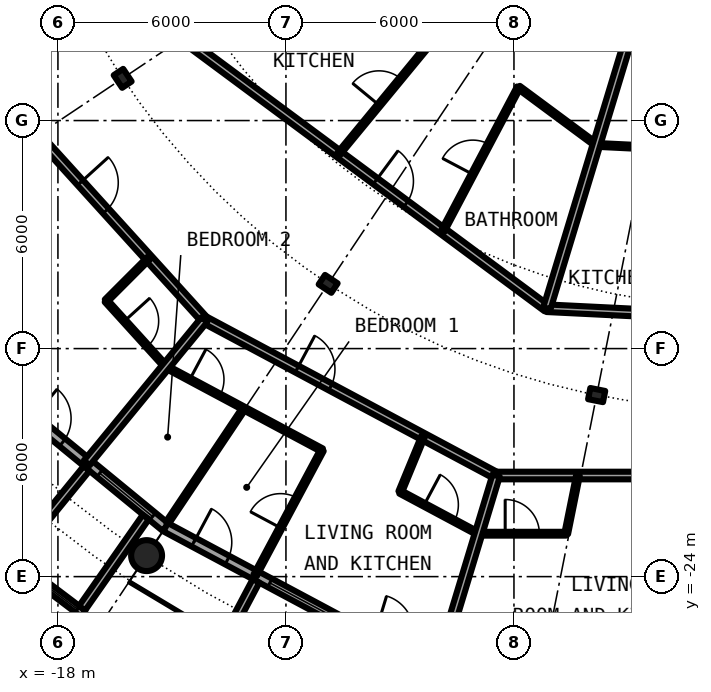
"""IFC4 building model, lengths in metres.
Left out: names, types, materials, properties, quantities, classifications, styles, units other than length and angle.
Written with IfcOpenShell. Run it as: python <this file> out.ifc"""

import sys

from ifc_helpers import new_model, si_unit, direction, frame, frame_2d, origin, origin_2d, place, context, subcontext, project, spatial, rectangle, circle, hollow_circle, i_section, extrude, element, fill, save


model = new_model("IFC4")
c1 = context("Model", 3, precision=1e-05, world=origin(), true_north=direction((0.0, 1.0)))
c2 = subcontext(c1, "Body", "Model", "MODEL_VIEW")
j1 = project(units=[si_unit("LENGTHUNIT", "METRE"), si_unit("PLANEANGLEUNIT", "RADIAN")], contexts=[c1])
p1 = place(None, origin())
s1 = spatial("IfcSite", under=j1, at=p1, CompositionType="ELEMENT")
p2 = place(p1, origin())
s2 = spatial("IfcBuilding", under=s1, at=p2, CompositionType="ELEMENT")
p3 = place(p2, frame((0.0, 0.0, 218.8)))
s3 = spatial("IfcBuildingStorey", under=s2, at=p3, CompositionType="ELEMENT", Elevation=218.8)
p4 = place(p3, frame((-15.667, -23.448, 0.0), z_axis=(0.0, 0.0, 1.0), x_axis=(1.0, 0.0, 0.0)))
e1 = element("IfcColumn", 1, at=p4, inside=s3, PredefinedType="COLUMN", context=c2, shape_type="SweptSolid", body=[
    extrude(hollow_circle(Radius=0.406, WallThickness=0.03, at=origin_2d()), origin(), (0.0, 0.0, 1.0), 3.05),
])
for number, where, z_axis, x_axis in (
    (2, (-16.297, -10.889, 0.0), (0.0, 0.0, 1.0), (-0.831, -0.556, 0.0)),
    (3, (-10.889, -16.297, 0.0), (0.0, 0.0, 1.0), (-0.556, -0.831, 0.0)),
    (4, (-3.824, -19.223, 0.0), (0.0, 0.0, 1.0), (-0.195, -0.981, 0.0)),
):
    element("IfcColumn", number, at=place(p3, frame(where, z_axis=z_axis, x_axis=x_axis)), inside=s3, PredefinedType="COLUMN", context=c2, shape_type="SweptSolid", body=[
        extrude(i_section(OverallWidth=0.3, OverallDepth=0.4, WebThickness=0.013, FlangeThickness=0.024, FilletRadius=0.027, at=origin_2d()), origin(), (0.0, 0.0, 1.0), 3.05),
    ])
p5 = place(p3, frame((-19.304, -19.304, 0.0), z_axis=(0.0, 0.0, 1.0), x_axis=(0.773019449054, -0.634382322723, 0.0)))
e5 = element("IfcWall", 5, at=p5, inside=s3, PredefinedType="SOLIDWALL", context=c2, shape_type="SweptSolid", body=[
    extrude(rectangle(XDim=5.352, YDim=0.25, at=frame_2d((2.676, 0.0))), origin(), (0.0, 0.0, 1.0), 2.65),
])
p6 = place(p5, frame((0.841, 0.0, 0.0)))
e6 = element("IfcOpeningElement", 6, at=p6, cuts=e5, PredefinedType="OPENING", context=c2, shape_type="SweptSolid", body=[
    extrude(rectangle(XDim=1.0, YDim=2.2, at=frame_2d((0.5, 1.1))), frame((0.0, 0.135, 0.0), z_axis=(0.0, -1.0, 0.0), x_axis=(1.0, 0.0, 0.0)), (0.0, 0.0, 1.0), 0.27),
])
p7 = place(p5, frame((3.111, 0.0, 0.3)))
e7 = element("IfcOpeningElement", 7, at=p7, cuts=e5, PredefinedType="OPENING", context=c2, shape_type="SweptSolid", body=[
    extrude(rectangle(XDim=1.8, YDim=2.1, at=frame_2d((0.9, 1.05))), frame((0.0, 0.135, 0.0), z_axis=(0.0, -1.0, 0.0), x_axis=(1.0, 0.0, 0.0)), (0.0, 0.0, 1.0), 0.27),
])
p8 = place(p3, frame((-19.289, -23.497, -0.03), z_axis=(0.0, 0.0, 1.0), x_axis=(0.797887588059, -0.602806268067, 0.0)))
e8 = element("IfcWall", 8, at=p8, inside=s3, PredefinedType="SOLIDWALL", context=c2, shape_type="SweptSolid", body=[
    extrude(rectangle(XDim=2.447, YDim=0.2, at=frame_2d((1.223, 0.0))), origin(), (0.0, 0.0, 1.0), 2.68),
])
p9 = place(p8, frame((0.183, 0.0, 0.33)))
e9 = element("IfcOpeningElement", 9, at=p9, cuts=e8, PredefinedType="OPENING", context=c2, shape_type="SweptSolid", body=[
    extrude(circle(Radius=1.04, at=frame_2d((1.04, 1.04))), frame((0.0, 0.11, 0.0), z_axis=(0.0, -1.0, 0.0), x_axis=(1.0, 0.0, 0.0)), (0.0, 0.0, 1.0), 0.22),
])
p10 = place(p3, frame((-17.246, -21.155, -0.03), z_axis=(0.0, 0.0, 1.0), x_axis=(-0.631741648902, -0.775179004516, 0.0)))
e10 = element("IfcWall", 10, at=p10, inside=s3, PredefinedType="SOLIDWALL", context=c2, shape_type="SweptSolid", body=[
    extrude(rectangle(XDim=3.006, YDim=0.2, at=frame_2d((1.503, 0.0))), origin(), (0.0, 0.0, 1.0), 2.68),
])
p11 = place(p3, frame((-15.688, -22.433, -0.03), z_axis=(0.0, 0.0, 1.0), x_axis=(-0.573260687834, -0.819373043115, 0.0)))
e11 = element("IfcWall", 11, at=p11, inside=s3, PredefinedType="SOLIDWALL", context=c2, shape_type="SweptSolid", body=[
    extrude(rectangle(XDim=2.925, YDim=0.2, at=frame_2d((1.463, 0.0))), origin(), (0.0, 0.0, 1.0), 2.68),
])
p12 = place(p3, frame((-15.167, -22.699, 0.0), z_axis=(0.0, 0.0, 1.0), x_axis=(0.881915646801, -0.471407246368, 0.0)))
e12 = element("IfcWall", 12, at=p12, inside=s3, PredefinedType="SOLIDWALL", context=c2, shape_type="SweptSolid", body=[
    extrude(rectangle(XDim=5.352, YDim=0.25, at=frame_2d((2.676, 0.0))), origin(), (0.0, 0.0, 1.0), 2.65),
])
p13 = place(p12, frame((0.841, 0.0, 0.0)))
e13 = element("IfcOpeningElement", 13, at=p13, cuts=e12, PredefinedType="OPENING", context=c2, shape_type="SweptSolid", body=[
    extrude(rectangle(XDim=1.0, YDim=2.2, at=frame_2d((0.5, 1.1))), frame((0.0, 0.135, 0.0), z_axis=(0.0, -1.0, 0.0), x_axis=(1.0, 0.0, 0.0)), (0.0, 0.0, 1.0), 0.27),
])
p14 = place(p12, frame((3.111, 0.0, 0.3)))
e14 = element("IfcOpeningElement", 14, at=p14, cuts=e12, PredefinedType="OPENING", context=c2, shape_type="SweptSolid", body=[
    extrude(rectangle(XDim=1.8, YDim=2.1, at=frame_2d((0.9, 1.05))), frame((0.0, 0.135, 0.0), z_axis=(0.0, -1.0, 0.0), x_axis=(1.0, 0.0, 0.0)), (0.0, 0.0, 1.0), 0.27),
])
p15 = place(p3, frame((-12.787, -24.113, -0.03), z_axis=(0.0, 0.0, 1.0), x_axis=(-0.468365282436, -0.883534924159, 0.0)))
e15 = element("IfcWall", 15, at=p15, inside=s3, PredefinedType="SOLIDWALL", context=c2, shape_type="SweptSolid", body=[
    extrude(rectangle(XDim=3.006, YDim=0.2, at=frame_2d((1.503, 0.0))), origin(), (0.0, 0.0, 1.0), 2.68),
])
p16 = place(p3, frame((-16.732, -16.743, 0.0), z_axis=(0.0, 0.0, 1.0), x_axis=(0.671528384412, -0.740978831634, 0.0)))
e16 = element("IfcWall", 16, at=p16, inside=s3, PredefinedType="PARTITIONING", context=c2, shape_type="SweptSolid", body=[
    extrude(rectangle(XDim=2.338, YDim=0.1, at=frame_2d((1.169, 0.0))), origin(), (0.0, 0.0, 1.0), 2.65),
])
p17 = place(p16, frame((0.719, 0.0, 0.0)))
e17 = element("IfcOpeningElement", 17, at=p17, cuts=e16, PredefinedType="OPENING", context=c2, shape_type="SweptSolid", body=[
    extrude(rectangle(XDim=0.9, YDim=2.3, at=frame_2d((0.45, 1.15))), frame((0.0, 0.06, 0.0), z_axis=(0.0, -1.0, 0.0), x_axis=(1.0, 0.0, 0.0)), (0.0, 0.0, 1.0), 0.12),
])
p18 = place(p3, frame((-15.162, -18.475, 0.0), z_axis=(0.0, 0.0, 1.0), x_axis=(0.881916280728, -0.471406060405, 0.0)))
e18 = element("IfcWall", 18, at=p18, inside=s3, PredefinedType="PARTITIONING", context=c2, shape_type="SweptSolid", body=[
    extrude(rectangle(XDim=4.663, YDim=0.1, at=frame_2d((2.331, 0.0))), origin(), (0.0, 0.0, 1.0), 2.65),
])
p19 = place(p18, frame((0.716, 0.0, 0.0)))
e19 = element("IfcOpeningElement", 19, at=p19, cuts=e18, PredefinedType="OPENING", context=c2, shape_type="SweptSolid", body=[
    extrude(rectangle(XDim=0.9, YDim=2.3, at=frame_2d((0.45, 1.15))), frame((0.0, 0.06, 0.0), z_axis=(0.0, -1.0, 0.0), x_axis=(1.0, 0.0, 0.0)), (0.0, 0.0, 1.0), 0.12),
])
p20 = place(p3, frame((-8.994, -21.772, 0.0), z_axis=(0.0, 0.0, 1.0), x_axis=(0.881882873346, -0.471468554305, 0.0)))
e20 = element("IfcWall", 20, at=p20, inside=s3, PredefinedType="PARTITIONING", context=c2, shape_type="SweptSolid", body=[
    extrude(rectangle(XDim=2.331, YDim=0.1, at=frame_2d((1.166, 0.0))), origin(), (0.0, 0.0, 1.0), 2.65),
])
p21 = place(p20, frame((0.716, 0.0, 0.0)))
e21 = element("IfcOpeningElement", 21, at=p21, cuts=e20, PredefinedType="OPENING", context=c2, shape_type="SweptSolid", body=[
    extrude(rectangle(XDim=0.9, YDim=2.3, at=frame_2d((0.45, 1.15))), frame((0.0, 0.06, 0.0), z_axis=(0.0, -1.0, 0.0), x_axis=(1.0, 0.0, 0.0)), (0.0, 0.0, 1.0), 0.12),
])
p22 = place(p3, frame((-6.938, -22.871, 0.0), z_axis=(0.0, 0.0, 1.0), x_axis=(1.0, 0.0, 0.0)))
e22 = element("IfcWall", 22, at=p22, inside=s3, PredefinedType="PARTITIONING", context=c2, shape_type="SweptSolid", body=[
    extrude(rectangle(XDim=2.313, YDim=0.1, at=frame_2d((1.156, 0.0))), origin(), (0.0, 0.0, 1.0), 2.65),
])
p23 = place(p22, frame((0.707, 0.0, 0.0)))
e23 = element("IfcOpeningElement", 23, at=p23, cuts=e22, PredefinedType="OPENING", context=c2, shape_type="SweptSolid", body=[
    extrude(rectangle(XDim=0.9, YDim=2.3, at=frame_2d((0.45, 1.15))), frame((0.0, 0.06, 0.0), z_axis=(0.0, -1.0, 0.0), x_axis=(1.0, 0.0, 0.0)), (0.0, 0.0, 1.0), 0.12),
])
p24 = place(p3, frame((-18.542, -12.389, 0.0), z_axis=(0.0, 0.0, 1.0), x_axis=(0.671561669125, -0.740948665268, 0.0)))
e24 = element("IfcWall", 24, at=p24, inside=s3, PredefinedType="PARTITIONING", context=c2, shape_type="SweptSolid", body=[
    extrude(rectangle(XDim=6.544, YDim=0.2, at=frame_2d((3.272, 0.0))), origin(), (0.0, 0.0, 1.0), 2.65),
])
p25 = place(p24, frame((1.682, 0.0, 0.0)))
e25 = element("IfcOpeningElement", 25, at=p25, cuts=e24, PredefinedType="OPENING", context=c2, shape_type="SweptSolid", body=[
    extrude(rectangle(XDim=1.0, YDim=2.3, at=frame_2d((0.5, 1.15))), frame((0.0, 0.11, 0.0), z_axis=(0.0, -1.0, 0.0), x_axis=(1.0, 0.0, 0.0)), (0.0, 0.0, 1.0), 0.22),
])
p26 = place(p3, frame((-14.147, -17.238, 0.0), z_axis=(0.0, 0.0, 1.0), x_axis=(0.881941116964, -0.471359593312, 0.0)))
e26 = element("IfcWall", 26, at=p26, inside=s3, PredefinedType="PARTITIONING", context=c2, shape_type="SweptSolid", body=[
    extrude(rectangle(XDim=8.705, YDim=0.2, at=frame_2d((4.352, 0.0))), origin(), (0.0, 0.0, 1.0), 2.65),
])
p27 = place(p26, frame((2.763, 0.0, 0.0)))
e27 = element("IfcOpeningElement", 27, at=p27, cuts=e26, PredefinedType="OPENING", context=c2, shape_type="SweptSolid", body=[
    extrude(rectangle(XDim=1.0, YDim=2.3, at=frame_2d((0.5, 1.15))), frame((0.0, 0.11, 0.0), z_axis=(0.0, -1.0, 0.0), x_axis=(1.0, 0.0, 0.0)), (0.0, 0.0, 1.0), 0.22),
])
p28 = place(p3, frame((-6.473, -21.34, 0.0), z_axis=(0.0, 0.0, 1.0), x_axis=(1.0, 0.0, 0.0)))
e28 = element("IfcWall", 28, at=p28, inside=s3, PredefinedType="PARTITIONING", context=c2, shape_type="SweptSolid", body=[
    extrude(rectangle(XDim=12.946, YDim=0.2, at=frame_2d((6.473, 0.0))), origin(), (0.0, 0.0, 1.0), 2.65),
])
p29 = place(p28, frame((7.051, 0.0, 0.0)))
e29 = element("IfcOpeningElement", 29, at=p29, cuts=e28, PredefinedType="OPENING", context=c2, shape_type="SweptSolid", body=[
    extrude(rectangle(XDim=1.0, YDim=2.3, at=frame_2d((0.5, 1.15))), frame((0.0, 0.11, 0.0), z_axis=(0.0, -1.0, 0.0), x_axis=(1.0, 0.0, 0.0)), (0.0, 0.0, 1.0), 0.22),
])
p30 = place(p3, frame((-5.138, -16.938, 0.0), z_axis=(0.0, 0.0, 1.0), x_axis=(0.998789433108, -0.049190124121, 0.0)))
e30 = element("IfcWall", 30, at=p30, inside=s3, PredefinedType="PARTITIONING", context=c2, shape_type="SweptSolid", body=[
    extrude(rectangle(XDim=8.601, YDim=0.2, at=frame_2d((4.301, 0.0))), origin(), (0.0, 0.0, 1.0), 2.65),
])
p31 = place(p30, frame((3.802, 0.0, 0.0)))
e31 = element("IfcOpeningElement", 31, at=p31, cuts=e30, PredefinedType="OPENING", context=c2, shape_type="SweptSolid", body=[
    extrude(rectangle(XDim=1.0, YDim=2.3, at=frame_2d((0.5, 1.15))), frame((0.0, 0.11, 0.0), z_axis=(0.0, -1.0, 0.0), x_axis=(1.0, 0.0, 0.0)), (0.0, 0.0, 1.0), 0.22),
])
p32 = place(p3, frame((-14.718, -9.833, 0.0), z_axis=(0.0, 0.0, 1.0), x_axis=(0.803240181354, -0.595655278712, 0.0)))
e32 = element("IfcWall", 32, at=p32, inside=s3, PredefinedType="PARTITIONING", context=c2, shape_type="SweptSolid", body=[
    extrude(rectangle(XDim=11.928, YDim=0.2, at=frame_2d((5.964, 0.0))), origin(), (0.0, 0.0, 1.0), 2.65),
])
p33 = place(p32, frame((6.316, 0.0, 0.0)))
e33 = element("IfcOpeningElement", 33, at=p33, cuts=e32, PredefinedType="OPENING", context=c2, shape_type="SweptSolid", body=[
    extrude(rectangle(XDim=1.0, YDim=2.3, at=frame_2d((0.5, 1.15))), frame((0.0, 0.11, 0.0), z_axis=(0.0, -1.0, 0.0), x_axis=(1.0, 0.0, 0.0)), (0.0, 0.0, 1.0), 0.22),
])
p34 = place(p3, frame((-3.834, -12.64, 0.0), z_axis=(0.0, 0.0, 1.0), x_axis=(0.998790464653, -0.049169174464, 0.0)))
e34 = element("IfcWall", 34, at=p34, inside=s3, PredefinedType="PARTITIONING", context=c2, shape_type="SweptSolid", body=[
    extrude(rectangle(XDim=2.567, YDim=0.1, at=frame_2d((1.284, 0.0))), origin(), (0.0, 0.0, 1.0), 2.65),
])
p35 = place(p3, frame((-5.874, -11.127, 0.0), z_axis=(0.0, 0.0, 1.0), x_axis=(0.803533389313, -0.595259684725, 0.0)))
e35 = element("IfcWall", 35, at=p35, inside=s3, PredefinedType="PARTITIONING", context=c2, shape_type="SweptSolid", body=[
    extrude(rectangle(XDim=2.544, YDim=0.1, at=frame_2d((1.272, 0.0))), origin(), (0.0, 0.0, 1.0), 2.65),
])
p36 = place(p3, frame((-17.24, -21.007, 0.0), z_axis=(0.0, 0.0, 1.0), x_axis=(0.634374159378, 0.773026148273, 0.0)))
e36 = element("IfcWall", 36, at=p36, inside=s3, PredefinedType="PARTITIONING", context=c2, shape_type="SweptSolid", body=[
    extrude(rectangle(XDim=4.876, YDim=0.2, at=frame_2d((2.438, 0.0))), origin(), (0.0, 0.0, 1.0), 2.65),
])
p37 = place(p3, frame((-16.732, -16.743, 0.0), z_axis=(0.0, 0.0, 1.0), x_axis=(0.70679853939, 0.707414888673, 0.0)))
e37 = element("IfcWall", 37, at=p37, inside=s3, PredefinedType="PARTITIONING", context=c2, shape_type="SweptSolid", body=[
    extrude(rectangle(XDim=1.584, YDim=0.1, at=frame_2d((0.792, 0.0))), origin(), (0.0, 0.0, 1.0), 2.65),
])
p38 = place(p3, frame((-15.119, -22.581, 0.0), z_axis=(0.0, 0.0, 1.0), x_axis=(0.556271723484, 0.831000463088, 0.0)))
e38 = element("IfcWall", 38, at=p38, inside=s3, PredefinedType="PARTITIONING", context=c2, shape_type="SweptSolid", body=[
    extrude(rectangle(XDim=3.619, YDim=0.1, at=frame_2d((1.809, 0.0))), origin(), (0.0, 0.0, 1.0), 2.65),
])
p39 = place(p3, frame((-12.81, -23.966, 0.0), z_axis=(0.0, 0.0, 1.0), x_axis=(0.471372010014, 0.881934480659, 0.0)))
e39 = element("IfcWall", 39, at=p39, inside=s3, PredefinedType="PARTITIONING", context=c2, shape_type="SweptSolid", body=[
    extrude(rectangle(XDim=3.734, YDim=0.1, at=frame_2d((1.867, 0.0))), origin(), (0.0, 0.0, 1.0), 2.65),
])
p40 = place(p39, frame((1.417, 0.0, 0.0)))
e40 = element("IfcOpeningElement", 40, at=p40, cuts=e39, PredefinedType="OPENING", context=c2, shape_type="SweptSolid", body=[
    extrude(rectangle(XDim=0.9, YDim=2.3, at=frame_2d((0.45, 1.15))), frame((0.0, 0.06, 0.0), z_axis=(0.0, -1.0, 0.0), x_axis=(1.0, 0.0, 0.0)), (0.0, 0.0, 1.0), 0.12),
])
p41 = place(p3, frame((-10.612, -12.878, 0.0), z_axis=(0.0, 0.0, 1.0), x_axis=(0.636115614725, 0.771593756262, 0.0)))
e41 = element("IfcWall", 41, at=p41, inside=s3, PredefinedType="PARTITIONING", context=c2, shape_type="SweptSolid", body=[
    extrude(rectangle(XDim=8.967, YDim=0.1, at=frame_2d((4.483, 0.0))), origin(), (0.0, 0.0, 1.0), 2.65),
])
p42 = place(p41, frame((1.667, 0.0, 0.0)))
e42 = element("IfcOpeningElement", 42, at=p42, cuts=e41, PredefinedType="OPENING", context=c2, shape_type="SweptSolid", body=[
    extrude(rectangle(XDim=0.9, YDim=2.3, at=frame_2d((0.45, 1.15))), frame((0.0, 0.06, 0.0), z_axis=(0.0, -1.0, 0.0), x_axis=(1.0, 0.0, 0.0)), (0.0, 0.0, 1.0), 0.12),
])
p43 = place(p41, frame((6.151, 0.0, 0.0)))
e43 = element("IfcOpeningElement", 43, at=p43, cuts=e41, PredefinedType="OPENING", context=c2, shape_type="SweptSolid", body=[
    extrude(rectangle(XDim=0.9, YDim=2.3, at=frame_2d((0.45, 1.15))), frame((0.0, 0.06, 0.0), z_axis=(0.0, -1.0, 0.0), x_axis=(1.0, 0.0, 0.0)), (0.0, 0.0, 1.0), 0.12),
])
p44 = place(p3, frame((-8.994, -21.772, 0.0), z_axis=(0.0, 0.0, 1.0), x_axis=(0.381535938362, 0.924354005638, 0.0)))
e44 = element("IfcWall", 44, at=p44, inside=s3, PredefinedType="PARTITIONING", context=c2, shape_type="SweptSolid", body=[
    extrude(rectangle(XDim=1.577, YDim=0.1, at=frame_2d((0.789, 0.0))), origin(), (0.0, 0.0, 1.0), 2.65),
])
p45 = place(p3, frame((-7.883, -26.006, 0.0), z_axis=(0.0, 0.0, 1.0), x_axis=(0.290085236897, 0.957000812609, 0.0)))
e45 = element("IfcWall", 45, at=p45, inside=s3, PredefinedType="PARTITIONING", context=c2, shape_type="SweptSolid", body=[
    extrude(rectangle(XDim=4.875, YDim=0.2, at=frame_2d((2.438, 0.0))), origin(), (0.0, 0.0, 1.0), 2.65),
])
p46 = place(p3, frame((-7.874, -14.909, 0.0), z_axis=(0.0, 0.0, 1.0), x_axis=(0.467030118529, 0.884241408432, 0.0)))
e46 = element("IfcWall", 46, at=p46, inside=s3, PredefinedType="PARTITIONING", context=c2, shape_type="SweptSolid", body=[
    extrude(rectangle(XDim=4.278, YDim=0.1, at=frame_2d((2.139, 0.0))), origin(), (0.0, 0.0, 1.0), 2.65),
])
p47 = place(p46, frame((1.69, 0.0, 0.0)))
e47 = element("IfcOpeningElement", 47, at=p47, cuts=e46, PredefinedType="OPENING", context=c2, shape_type="SweptSolid", body=[
    extrude(rectangle(XDim=0.9, YDim=2.3, at=frame_2d((0.45, 1.15))), frame((0.0, 0.06, 0.0), z_axis=(0.0, -1.0, 0.0), x_axis=(1.0, 0.0, 0.0)), (0.0, 0.0, 1.0), 0.12),
])
p48 = place(p3, frame((-5.134, -16.939, 0.0), z_axis=(0.0, 0.0, 1.0), x_axis=(0.290194791136, 0.956967597778, 0.0)))
e48 = element("IfcWall", 48, at=p48, inside=s3, PredefinedType="PARTITIONING", context=c2, shape_type="SweptSolid", body=[
    extrude(rectangle(XDim=9.979, YDim=0.2, at=frame_2d((4.99, 0.0))), origin(), (0.0, 0.0, 1.0), 2.65),
])
p49 = place(p3, frame((-4.625, -22.871, 0.0), z_axis=(0.0, 0.0, 1.0), x_axis=(0.19788933956, 0.98022436681, 0.0)))
e49 = element("IfcWall", 49, at=p49, inside=s3, PredefinedType="PARTITIONING", context=c2, shape_type="SweptSolid", body=[
    extrude(rectangle(XDim=1.562, YDim=0.1, at=frame_2d((0.781, 0.0))), origin(), (0.0, 0.0, 1.0), 2.65),
])
p50 = place(p6, origin())
e50 = element("IfcDoor", 50, at=p50, inside=s3, OperationType="SINGLE_SWING_LEFT", PredefinedType="DOOR", context=c2, shape_type="SweptSolid", body=[
    extrude(rectangle(XDim=1.0, YDim=2.2, at=frame_2d((0.5, 1.1))), frame((0.0, 0.025, 0.0), z_axis=(0.0, -1.0, 0.0), x_axis=(1.0, 0.0, 0.0)), (0.0, 0.0, 1.0), 0.05),
])
fill(e6, e50)
p51 = place(p7, origin())
e51 = element("IfcWindow", 51, at=p51, inside=s3, PartitioningType="SINGLE_PANEL", PredefinedType="WINDOW", context=c2, shape_type="SweptSolid", body=[
    extrude(rectangle(XDim=1.8, YDim=2.1, at=frame_2d((0.9, 1.05))), frame((0.0, 0.03, 0.0), z_axis=(0.0, -1.0, 0.0), x_axis=(1.0, 0.0, 0.0)), (0.0, 0.0, 1.0), 0.06),
])
fill(e7, e51)
p52 = place(p9, origin())
e52 = element("IfcWindow", 52, at=p52, inside=s3, PartitioningType="SINGLE_PANEL", PredefinedType="WINDOW", context=c2, shape_type="SweptSolid", body=[
    extrude(circle(Radius=1.04, at=frame_2d((1.04, 1.04))), frame((0.0, 0.03, 0.0), z_axis=(0.0, -1.0, 0.0), x_axis=(1.0, 0.0, 0.0)), (0.0, 0.0, 1.0), 0.06),
])
fill(e9, e52)
p53 = place(p13, origin())
e53 = element("IfcDoor", 53, at=p53, inside=s3, OperationType="SINGLE_SWING_LEFT", PredefinedType="DOOR", context=c2, shape_type="SweptSolid", body=[
    extrude(rectangle(XDim=1.0, YDim=2.2, at=frame_2d((0.5, 1.1))), frame((0.0, 0.025, 0.0), z_axis=(0.0, -1.0, 0.0), x_axis=(1.0, 0.0, 0.0)), (0.0, 0.0, 1.0), 0.05),
])
fill(e13, e53)
p54 = place(p14, origin())
e54 = element("IfcWindow", 54, at=p54, inside=s3, PartitioningType="SINGLE_PANEL", PredefinedType="WINDOW", context=c2, shape_type="SweptSolid", body=[
    extrude(rectangle(XDim=1.8, YDim=2.1, at=frame_2d((0.9, 1.05))), frame((0.0, 0.03, 0.0), z_axis=(0.0, -1.0, 0.0), x_axis=(1.0, 0.0, 0.0)), (0.0, 0.0, 1.0), 0.06),
])
fill(e14, e54)
p55 = place(p25, origin())
e55 = element("IfcDoor", 55, at=p55, inside=s3, OperationType="SINGLE_SWING_LEFT", PredefinedType="DOOR", context=c2, shape_type="SweptSolid", body=[
    extrude(rectangle(XDim=1.0, YDim=2.3, at=frame_2d((0.5, 1.15))), frame((0.0, 0.025, 0.0), z_axis=(0.0, -1.0, 0.0), x_axis=(1.0, 0.0, 0.0)), (0.0, 0.0, 1.0), 0.05),
])
fill(e25, e55)
p56 = place(p17, origin())
e56 = element("IfcDoor", 56, at=p56, inside=s3, OperationType="SINGLE_SWING_LEFT", PredefinedType="DOOR", context=c2, shape_type="SweptSolid", body=[
    extrude(rectangle(XDim=0.9, YDim=2.3, at=frame_2d((0.45, 1.15))), frame((0.0, 0.025, 0.0), z_axis=(0.0, -1.0, 0.0), x_axis=(1.0, 0.0, 0.0)), (0.0, 0.0, 1.0), 0.05),
])
fill(e17, e56)
p57 = place(p27, origin())
e57 = element("IfcDoor", 57, at=p57, inside=s3, OperationType="SINGLE_SWING_LEFT", PredefinedType="DOOR", context=c2, shape_type="SweptSolid", body=[
    extrude(rectangle(XDim=1.0, YDim=2.3, at=frame_2d((0.5, 1.15))), frame((0.0, 0.025, 0.0), z_axis=(0.0, -1.0, 0.0), x_axis=(1.0, 0.0, 0.0)), (0.0, 0.0, 1.0), 0.05),
])
fill(e27, e57)
p58 = place(p21, origin())
e58 = element("IfcDoor", 58, at=p58, inside=s3, OperationType="SINGLE_SWING_RIGHT", PredefinedType="DOOR", context=c2, shape_type="SweptSolid", body=[
    extrude(rectangle(XDim=0.9, YDim=2.3, at=frame_2d((0.45, 1.15))), frame((0.0, 0.025, 0.0), z_axis=(0.0, -1.0, 0.0), x_axis=(1.0, 0.0, 0.0)), (0.0, 0.0, 1.0), 0.05),
])
fill(e21, e58)
p59 = place(p40, origin())
e59 = element("IfcDoor", 59, at=p59, inside=s3, OperationType="SINGLE_SWING_RIGHT", PredefinedType="DOOR", context=c2, shape_type="SweptSolid", body=[
    extrude(rectangle(XDim=0.9, YDim=2.3, at=frame_2d((0.45, 1.15))), frame((0.0, 0.025, 0.0), z_axis=(0.0, -1.0, 0.0), x_axis=(1.0, 0.0, 0.0)), (0.0, 0.0, 1.0), 0.05),
])
fill(e40, e59)
p60 = place(p19, origin())
e60 = element("IfcDoor", 60, at=p60, inside=s3, OperationType="SINGLE_SWING_LEFT", PredefinedType="DOOR", context=c2, shape_type="SweptSolid", body=[
    extrude(rectangle(XDim=0.9, YDim=2.3, at=frame_2d((0.45, 1.15))), frame((0.0, 0.025, 0.0), z_axis=(0.0, -1.0, 0.0), x_axis=(1.0, 0.0, 0.0)), (0.0, 0.0, 1.0), 0.05),
])
fill(e19, e60)
p61 = place(p23, origin())
e61 = element("IfcDoor", 61, at=p61, inside=s3, OperationType="SINGLE_SWING_RIGHT", PredefinedType="DOOR", context=c2, shape_type="SweptSolid", body=[
    extrude(rectangle(XDim=0.9, YDim=2.3, at=frame_2d((0.45, 1.15))), frame((0.0, 0.025, 0.0), z_axis=(0.0, -1.0, 0.0), x_axis=(1.0, 0.0, 0.0)), (0.0, 0.0, 1.0), 0.05),
])
fill(e23, e61)
p62 = place(p33, origin())
e62 = element("IfcDoor", 62, at=p62, inside=s3, OperationType="SINGLE_SWING_RIGHT", PredefinedType="DOOR", context=c2, shape_type="SweptSolid", body=[
    extrude(rectangle(XDim=1.0, YDim=2.3, at=frame_2d((0.5, 1.15))), frame((0.0, 0.025, 0.0), z_axis=(0.0, -1.0, 0.0), x_axis=(1.0, 0.0, 0.0)), (0.0, 0.0, 1.0), 0.05),
])
fill(e33, e62)
p63 = place(p47, origin())
e63 = element("IfcDoor", 63, at=p63, inside=s3, OperationType="SINGLE_SWING_RIGHT", PredefinedType="DOOR", context=c2, shape_type="SweptSolid", body=[
    extrude(rectangle(XDim=0.9, YDim=2.3, at=frame_2d((0.45, 1.15))), frame((0.0, 0.025, 0.0), z_axis=(0.0, -1.0, 0.0), x_axis=(1.0, 0.0, 0.0)), (0.0, 0.0, 1.0), 0.05),
])
fill(e47, e63)
p64 = place(p42, origin())
e64 = element("IfcDoor", 64, at=p64, inside=s3, OperationType="SINGLE_SWING_LEFT", PredefinedType="DOOR", context=c2, shape_type="SweptSolid", body=[
    extrude(rectangle(XDim=0.9, YDim=2.3, at=frame_2d((0.45, 1.15))), frame((0.0, 0.025, 0.0), z_axis=(0.0, -1.0, 0.0), x_axis=(1.0, 0.0, 0.0)), (0.0, 0.0, 1.0), 0.05),
])
fill(e42, e64)
save(model, sys.argv[1])
